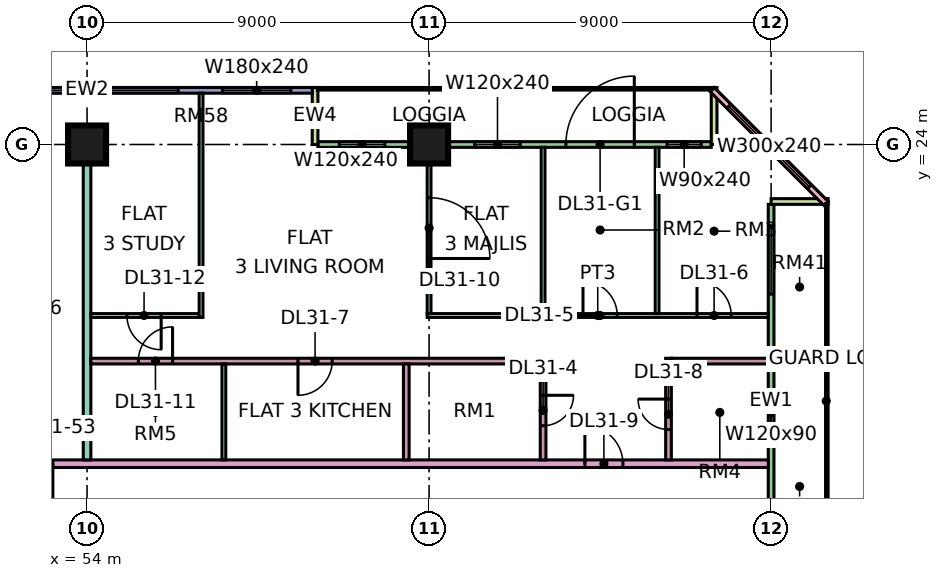
"""IFC4 building model, lengths in metres.
Left out: names, types, materials, properties, quantities, classifications, styles, units other than length and angle.
Written with IfcOpenShell. Run it as: python <this file> out.ifc"""

import sys

from ifc_helpers import new_model, si_unit, direction, frame, frame_2d, origin, origin_2d, place, context, subcontext, project, spatial, rectangle, extrude, element, fill, save


model = new_model("IFC4")
c1 = context("Model", 3, precision=1e-05, world=origin(), true_north=direction((0.0, 1.0)))
c2 = subcontext(c1, "Body", "Model", "MODEL_VIEW")
j1 = project(units=[si_unit("LENGTHUNIT", "METRE"), si_unit("PLANEANGLEUNIT", "RADIAN")], contexts=[c1])
p1 = place(None, origin())
s1 = spatial("IfcSite", under=j1, at=p1, CompositionType="ELEMENT")
p2 = place(p1, origin())
s2 = spatial("IfcBuilding", under=s1, at=p2, CompositionType="ELEMENT")
p3 = place(p2, frame((0.0, 0.0, 133.15)))
s3 = spatial("IfcBuildingStorey", under=s2, at=p3, CompositionType="ELEMENT", Elevation=133.15)
for number, where, z_axis, x_axis in (
    (1, (54.0, 24.0, 0.0), (0.0, 0.0, 1.0), (1.0, 0.0, 0.0)),
    (2, (63.0, 24.0, 0.0), (0.0, 0.0, 1.0), (1.0, 0.0, 0.0)),
):
    element("IfcColumn", number, at=place(p3, frame(where, z_axis=z_axis, x_axis=x_axis)), inside=s3, PredefinedType="COLUMN", context=c2, shape_type="SweptSolid", body=[
        extrude(rectangle(XDim=1.0, YDim=1.0, at=origin_2d()), origin(), (0.0, 0.0, 1.0), 3.75),
    ])
p4 = place(p3, frame((70.425, 24.0, 0.0), z_axis=(0.0, 0.0, 1.0), x_axis=(-1.0, 0.0, 0.0)))
e3 = element("IfcWall", 3, at=p4, inside=s3, PredefinedType="SOLIDWALL", context=c2, shape_type="SweptSolid", body=[
    extrude(rectangle(XDim=10.35, YDim=0.15, at=frame_2d((5.175, 0.0))), origin(), (0.0, 0.0, 1.0), 3.35),
])
p5 = place(p4, frame((0.262, 0.0, 0.45)))
e4 = element("IfcOpeningElement", 4, at=p5, cuts=e3, PredefinedType="OPENING", context=c2, shape_type="SweptSolid", body=[
    extrude(rectangle(XDim=0.9, YDim=2.4, at=frame_2d((0.45, 1.2))), frame((0.0, 0.085, 0.0), z_axis=(0.0, -1.0, 0.0), x_axis=(1.0, 0.0, 0.0)), (0.0, 0.0, 1.0), 0.17),
])
p6 = place(p4, frame((2.025, 0.0, 0.0)))
e5 = element("IfcOpeningElement", 5, at=p6, cuts=e3, PredefinedType="OPENING", context=c2, shape_type="SweptSolid", body=[
    extrude(rectangle(XDim=1.8, YDim=2.4, at=frame_2d((0.9, 1.2))), frame((0.0, 0.085, 0.0), z_axis=(0.0, -1.0, 0.0), x_axis=(1.0, 0.0, 0.0)), (0.0, 0.0, 1.0), 0.17),
])
p7 = place(p4, frame((5.025, 0.0, 0.45)))
e6 = element("IfcOpeningElement", 6, at=p7, cuts=e3, PredefinedType="OPENING", context=c2, shape_type="SweptSolid", body=[
    extrude(rectangle(XDim=1.2, YDim=2.4, at=frame_2d((0.6, 1.2))), frame((0.0, 0.085, 0.0), z_axis=(0.0, -1.0, 0.0), x_axis=(1.0, 0.0, 0.0)), (0.0, 0.0, 1.0), 0.17),
])
p8 = place(p4, frame((8.587, 0.0, 0.45)))
e7 = element("IfcOpeningElement", 7, at=p8, cuts=e3, PredefinedType="OPENING", context=c2, shape_type="SweptSolid", body=[
    extrude(rectangle(XDim=1.2, YDim=2.4, at=frame_2d((0.6, 1.2))), frame((0.0, 0.085, 0.0), z_axis=(0.0, -1.0, 0.0), x_axis=(1.0, 0.0, 0.0)), (0.0, 0.0, 1.0), 0.17),
])
for number, where, z_axis, x_axis in (
    (8, (70.5, 25.5, 0.0), (0.0, 0.0, 1.0), (0.0, -1.0, 0.0)),
    (9, (60.0, 25.5, 0.0), (0.0, 0.0, 1.0), (0.0, -1.0, 0.0)),
):
    element("IfcWall", number, at=place(p3, frame(where, z_axis=z_axis, x_axis=x_axis)), inside=s3, PredefinedType="SOLIDWALL", context=c2, shape_type="SweptSolid", body=[
        extrude(rectangle(XDim=1.5, YDim=0.15, at=frame_2d((0.75, 0.0))), origin(), (0.0, 0.0, 1.0), 3.35),
    ])
p9 = place(p3, frame((59.925, 25.425, 0.0), z_axis=(0.0, 0.0, 1.0), x_axis=(-1.0, 0.0, 0.0)))
e10 = element("IfcWall", 10, at=p9, inside=s3, PredefinedType="SOLIDWALL", context=c2, shape_type="SweptSolid", body=[
    extrude(rectangle(XDim=11.85, YDim=0.15, at=frame_2d((5.925, 0.0))), origin(), (0.0, 0.0, 1.0), 3.35),
])
p10 = place(p9, frame((0.562, 0.0, 0.45)))
e11 = element("IfcOpeningElement", 11, at=p10, cuts=e10, PredefinedType="OPENING", context=c2, shape_type="SweptSolid", body=[
    extrude(rectangle(XDim=1.8, YDim=2.4, at=frame_2d((0.9, 1.2))), frame((0.0, 0.085, 0.0), z_axis=(0.0, -1.0, 0.0), x_axis=(1.0, 0.0, 0.0)), (0.0, 0.0, 1.0), 0.17),
])
p11 = place(p9, frame((3.525, 0.0, 0.45)))
e12 = element("IfcOpeningElement", 12, at=p11, cuts=e10, PredefinedType="OPENING", context=c2, shape_type="SweptSolid", body=[
    extrude(rectangle(XDim=1.8, YDim=2.4, at=frame_2d((0.9, 1.2))), frame((0.0, 0.085, 0.0), z_axis=(0.0, -1.0, 0.0), x_axis=(1.0, 0.0, 0.0)), (0.0, 0.0, 1.0), 0.17),
])
p12 = place(p9, frame((6.488, 0.0, 0.45)))
e13 = element("IfcOpeningElement", 13, at=p12, cuts=e10, PredefinedType="OPENING", context=c2, shape_type="SweptSolid", body=[
    extrude(rectangle(XDim=4.8, YDim=2.4, at=frame_2d((2.4, 1.2))), frame((0.0, 0.085, 0.0), z_axis=(0.0, -1.0, 0.0), x_axis=(1.0, 0.0, 0.0)), (0.0, 0.0, 1.0), 0.17),
])
p13 = place(p3, frame((72.0, 12.075, 0.0), z_axis=(0.0, 0.0, 1.0), x_axis=(0.0, 1.0, 0.0)))
e14 = element("IfcWall", 14, at=p13, inside=s3, PredefinedType="SOLIDWALL", context=c2, shape_type="SweptSolid", body=[
    extrude(rectangle(XDim=10.35, YDim=0.15, at=frame_2d((5.175, 0.0))), origin(), (0.0, 0.0, 1.0), 3.35),
])
p14 = place(p13, frame((4.275, 0.0, 1.7)))
e15 = element("IfcOpeningElement", 15, at=p14, cuts=e14, PredefinedType="OPENING", context=c2, shape_type="SweptSolid", body=[
    extrude(rectangle(XDim=1.2, YDim=0.9, at=frame_2d((0.6, 0.45))), frame((0.0, 0.085, 0.0), z_axis=(0.0, -1.0, 0.0), x_axis=(1.0, 0.0, 0.0)), (0.0, 0.0, 1.0), 0.17),
])
p15 = place(p13, frame((7.988, 0.0, 0.45)))
e16 = element("IfcOpeningElement", 16, at=p15, cuts=e14, PredefinedType="OPENING", context=c2, shape_type="SweptSolid", body=[
    extrude(rectangle(XDim=1.8, YDim=2.4, at=frame_2d((0.9, 1.2))), frame((0.0, 0.085, 0.0), z_axis=(0.0, -1.0, 0.0), x_axis=(1.0, 0.0, 0.0)), (0.0, 0.0, 1.0), 0.17),
])
p16 = place(p3, frame((73.5, 22.5, 0.0), z_axis=(0.0, 0.0, 1.0), x_axis=(-1.0, 0.0, 0.0)))
e17 = element("IfcWall", 17, at=p16, inside=s3, PredefinedType="SOLIDWALL", context=c2, shape_type="SweptSolid", body=[
    extrude(rectangle(XDim=1.5, YDim=0.15, at=frame_2d((0.75, 0.0))), origin(), (0.0, 0.0, 1.0), 3.35),
])
p17 = place(p3, frame((73.447, 22.447, 0.0), z_axis=(0.0, 0.0, 1.0), x_axis=(-0.707106781187, 0.707106781187, 0.0)))
e18 = element("IfcWall", 18, at=p17, inside=s3, PredefinedType="SOLIDWALL", context=c2, shape_type="SweptSolid", body=[
    extrude(rectangle(XDim=4.243, YDim=0.15, at=frame_2d((2.121, 0.0))), origin(), (0.0, 0.0, 1.0), 3.35),
])
p18 = place(p17, frame((0.621, 0.0, 0.45)))
e19 = element("IfcOpeningElement", 19, at=p18, cuts=e18, PredefinedType="OPENING", context=c2, shape_type="SweptSolid", body=[
    extrude(rectangle(XDim=3.0, YDim=2.4, at=frame_2d((1.5, 1.2))), frame((0.0, 0.085, 0.0), z_axis=(0.0, -1.0, 0.0), x_axis=(1.0, 0.0, 0.0)), (0.0, 0.0, 1.0), 0.17),
])
p19 = place(p3, frame((51.225, 15.6, 0.0), z_axis=(0.0, 0.0, 1.0), x_axis=(1.0, 0.0, 0.0)))
e20 = element("IfcWall", 20, at=p19, inside=s3, PredefinedType="PARTITIONING", context=c2, shape_type="SweptSolid", body=[
    extrude(rectangle(XDim=20.701, YDim=0.2, at=frame_2d((10.351, 0.0))), origin(), (0.0, 0.0, 1.0), 3.35),
])
p20 = place(p19, frame((15.875, 0.0, 0.0)))
e21 = element("IfcOpeningElement", 21, at=p20, cuts=e20, PredefinedType="OPENING", context=c2, shape_type="SweptSolid", body=[
    extrude(rectangle(XDim=1.0, YDim=2.1, at=frame_2d((0.5, 1.05))), frame((0.0, 0.11, 0.0), z_axis=(0.0, -1.0, 0.0), x_axis=(1.0, 0.0, 0.0)), (0.0, 0.0, 1.0), 0.22),
])
p21 = place(p19, frame((0.875, 0.0, 0.0)))
e22 = element("IfcOpeningElement", 22, at=p21, cuts=e20, PredefinedType="OPENING", context=c2, shape_type="SweptSolid", body=[
    extrude(rectangle(XDim=1.0, YDim=2.1, at=frame_2d((0.5, 1.05))), frame((0.0, 0.11, 0.0), z_axis=(0.0, -1.0, 0.0), x_axis=(1.0, 0.0, 0.0)), (0.0, 0.0, 1.0), 0.22),
])
p22 = place(p3, frame((54.0, 15.7, 0.0), z_axis=(0.0, 0.0, 1.0), x_axis=(0.0, 1.0, 0.0)))
e23 = element("IfcWall", 23, at=p22, inside=s3, PredefinedType="PARTITIONING", context=c2, shape_type="SweptSolid", body=[
    extrude(rectangle(XDim=8.3, YDim=0.2, at=frame_2d((4.15, 0.0))), origin(), (0.0, 0.0, 1.0), 3.35),
])
p23 = place(p3, frame((54.1, 18.3, 0.0), z_axis=(0.0, 0.0, 1.0), x_axis=(1.0, 0.0, 0.0)))
e24 = element("IfcWall", 24, at=p23, inside=s3, PredefinedType="PARTITIONING", context=c2, shape_type="SweptSolid", body=[
    extrude(rectangle(XDim=11.975, YDim=0.15, at=frame_2d((5.987, 0.0))), origin(), (0.0, 0.0, 1.0), 3.35),
])
p24 = place(p23, frame((5.45, 0.0, 0.0)))
e25 = element("IfcOpeningElement", 25, at=p24, cuts=e24, PredefinedType="OPENING", context=c2, shape_type="SweptSolid", body=[
    extrude(rectangle(XDim=0.9, YDim=2.1, at=frame_2d((0.45, 1.05))), frame((0.0, 0.085, 0.0), z_axis=(0.0, -1.0, 0.0), x_axis=(1.0, 0.0, 0.0)), (0.0, 0.0, 1.0), 0.17),
])
p25 = place(p23, frame((1.25, 0.0, 0.0)))
e26 = element("IfcOpeningElement", 26, at=p25, cuts=e24, PredefinedType="OPENING", context=c2, shape_type="SweptSolid", body=[
    extrude(rectangle(XDim=0.9, YDim=2.1, at=frame_2d((0.45, 1.05))), frame((0.0, 0.085, 0.0), z_axis=(0.0, -1.0, 0.0), x_axis=(1.0, 0.0, 0.0)), (0.0, 0.0, 1.0), 0.17),
])
p26 = place(p3, frame((54.1, 19.5, 0.0), z_axis=(0.0, 0.0, 1.0), x_axis=(1.0, 0.0, 0.0)))
e27 = element("IfcWall", 27, at=p26, inside=s3, PredefinedType="PARTITIONING", context=c2, shape_type="SweptSolid", body=[
    extrude(rectangle(XDim=2.85, YDim=0.1, at=frame_2d((1.425, 0.0))), origin(), (0.0, 0.0, 1.0), 3.35),
])
p27 = place(p26, frame((0.95, 0.0, 0.0)))
e28 = element("IfcOpeningElement", 28, at=p27, cuts=e27, PredefinedType="OPENING", context=c2, shape_type="SweptSolid", body=[
    extrude(rectangle(XDim=0.9, YDim=2.1, at=frame_2d((0.45, 1.05))), frame((0.0, 0.06, 0.0), z_axis=(0.0, -1.0, 0.0), x_axis=(1.0, 0.0, 0.0)), (0.0, 0.0, 1.0), 0.12),
])
p28 = place(p3, frame((57.0, 19.45, 0.0), z_axis=(0.0, 0.0, 1.0), x_axis=(0.0, 1.0, 0.0)))
e29 = element("IfcWall", 29, at=p28, inside=s3, PredefinedType="PARTITIONING", context=c2, shape_type="SweptSolid", body=[
    extrude(rectangle(XDim=5.9, YDim=0.1, at=frame_2d((2.95, 0.0))), origin(), (0.0, 0.0, 1.0), 3.35),
])
p29 = place(p3, frame((57.6, 15.7, 0.0), z_axis=(0.0, 0.0, 1.0), x_axis=(0.0, 1.0, 0.0)))
e30 = element("IfcWall", 30, at=p29, inside=s3, PredefinedType="PARTITIONING", context=c2, shape_type="SweptSolid", body=[
    extrude(rectangle(XDim=2.525, YDim=0.1, at=frame_2d((1.263, 0.0))), origin(), (0.0, 0.0, 1.0), 3.35),
])
p30 = place(p3, frame((62.4, 15.7, 0.0), z_axis=(0.0, 0.0, 1.0), x_axis=(0.0, 1.0, 0.0)))
e31 = element("IfcWall", 31, at=p30, inside=s3, PredefinedType="PARTITIONING", context=c2, shape_type="SweptSolid", body=[
    extrude(rectangle(XDim=2.525, YDim=0.15, at=frame_2d((1.263, 0.0))), origin(), (0.0, 0.0, 1.0), 3.35),
])
p31 = place(p3, frame((62.95, 19.5, 0.0), z_axis=(0.0, 0.0, 1.0), x_axis=(1.0, 0.0, 0.0)))
e32 = element("IfcWall", 32, at=p31, inside=s3, PredefinedType="PARTITIONING", context=c2, shape_type="SweptSolid", body=[
    extrude(rectangle(XDim=8.976, YDim=0.1, at=frame_2d((4.488, 0.0))), origin(), (0.0, 0.0, 1.0), 3.35),
])
p32 = place(p31, frame((4.1, 0.0, 0.0)))
e33 = element("IfcOpeningElement", 33, at=p32, cuts=e32, PredefinedType="OPENING", context=c2, shape_type="SweptSolid", body=[
    extrude(rectangle(XDim=0.9, YDim=2.1, at=frame_2d((0.45, 1.05))), frame((0.0, 0.06, 0.0), z_axis=(0.0, -1.0, 0.0), x_axis=(1.0, 0.0, 0.0)), (0.0, 0.0, 1.0), 0.12),
])
p33 = place(p31, frame((7.1, 0.0, 0.0)))
e34 = element("IfcOpeningElement", 34, at=p33, cuts=e32, PredefinedType="OPENING", context=c2, shape_type="SweptSolid", body=[
    extrude(rectangle(XDim=0.9, YDim=2.1, at=frame_2d((0.45, 1.05))), frame((0.0, 0.06, 0.0), z_axis=(0.0, -1.0, 0.0), x_axis=(1.0, 0.0, 0.0)), (0.0, 0.0, 1.0), 0.12),
])
p34 = place(p3, frame((63.0, 19.55, 0.0), z_axis=(0.0, 0.0, 1.0), x_axis=(0.0, 1.0, 0.0)))
e35 = element("IfcWall", 35, at=p34, inside=s3, PredefinedType="PARTITIONING", context=c2, shape_type="SweptSolid", body=[
    extrude(rectangle(XDim=4.376, YDim=0.1, at=frame_2d((2.188, 0.0))), origin(), (0.0, 0.0, 1.0), 3.35),
])
p35 = place(p34, frame((1.45, 0.0, 0.0)))
e36 = element("IfcOpeningElement", 36, at=p35, cuts=e35, PredefinedType="OPENING", context=c2, shape_type="SweptSolid", body=[
    extrude(rectangle(XDim=1.6, YDim=2.1, at=frame_2d((0.8, 1.05))), frame((0.0, 0.06, 0.0), z_axis=(0.0, -1.0, 0.0), x_axis=(1.0, 0.0, 0.0)), (0.0, 0.0, 1.0), 0.12),
])
p36 = place(p3, frame((66.0, 15.7, 0.0), z_axis=(0.0, 0.0, 1.0), x_axis=(0.0, 1.0, 0.0)))
e37 = element("IfcWall", 37, at=p36, inside=s3, PredefinedType="PARTITIONING", context=c2, shape_type="SweptSolid", body=[
    extrude(rectangle(XDim=2.525, YDim=0.15, at=frame_2d((1.263, 0.0))), origin(), (0.0, 0.0, 1.0), 3.35),
])
p37 = place(p36, frame((0.9, 0.0, 0.0)))
e38 = element("IfcOpeningElement", 38, at=p37, cuts=e37, PredefinedType="OPENING", context=c2, shape_type="SweptSolid", body=[
    extrude(rectangle(XDim=0.8, YDim=2.1, at=frame_2d((0.4, 1.05))), frame((0.0, 0.085, 0.0), z_axis=(0.0, -1.0, 0.0), x_axis=(1.0, 0.0, 0.0)), (0.0, 0.0, 1.0), 0.17),
])
for number, where, z_axis, x_axis in (
    (39, (66.0, 19.55, 0.0), (0.0, 0.0, 1.0), (0.0, 1.0, 0.0)),
    (40, (69.0, 19.55, 0.0), (0.0, 0.0, 1.0), (0.0, 1.0, 0.0)),
):
    element("IfcWall", number, at=place(p3, frame(where, z_axis=z_axis, x_axis=x_axis)), inside=s3, PredefinedType="PARTITIONING", context=c2, shape_type="SweptSolid", body=[
        extrude(rectangle(XDim=4.376, YDim=0.1, at=frame_2d((2.188, 0.0))), origin(), (0.0, 0.0, 1.0), 3.35),
    ])
p38 = place(p3, frame((69.3, 15.7, 0.0), z_axis=(0.0, 0.0, 1.0), x_axis=(0.0, 1.0, 0.0)))
e41 = element("IfcWall", 41, at=p38, inside=s3, PredefinedType="PARTITIONING", context=c2, shape_type="SweptSolid", body=[
    extrude(rectangle(XDim=2.675, YDim=0.15, at=frame_2d((1.337, 0.0))), origin(), (0.0, 0.0, 1.0), 3.35),
])
p39 = place(p38, frame((0.8, 0.0, 0.0)))
e42 = element("IfcOpeningElement", 42, at=p39, cuts=e41, PredefinedType="OPENING", context=c2, shape_type="SweptSolid", body=[
    extrude(rectangle(XDim=0.8, YDim=2.1, at=frame_2d((0.4, 1.05))), frame((0.0, 0.085, 0.0), z_axis=(0.0, -1.0, 0.0), x_axis=(1.0, 0.0, 0.0)), (0.0, 0.0, 1.0), 0.17),
])
p40 = place(p3, frame((69.375, 18.3, 0.0), z_axis=(0.0, 0.0, 1.0), x_axis=(1.0, 0.0, 0.0)))
e43 = element("IfcWall", 43, at=p40, inside=s3, PredefinedType="PARTITIONING", context=c2, shape_type="SweptSolid", body=[
    extrude(rectangle(XDim=2.551, YDim=0.15, at=frame_2d((1.275, 0.0))), origin(), (0.0, 0.0, 1.0), 3.35),
])
p41 = place(p5, origin())
e44 = element("IfcWindow", 44, at=p41, inside=s3, PartitioningType="SINGLE_PANEL", PredefinedType="WINDOW", context=c2, shape_type="SweptSolid", body=[
    extrude(rectangle(XDim=0.9, YDim=2.4, at=frame_2d((0.45, 1.2))), frame((0.0, 0.03, 0.0), z_axis=(0.0, -1.0, 0.0), x_axis=(1.0, 0.0, 0.0)), (0.0, 0.0, 1.0), 0.06),
])
fill(e4, e44)
p42 = place(p6, frame((1.8, 0.0, 0.0), z_axis=(0.0, 0.0, 1.0), x_axis=(-1.0, 0.0, 0.0)))
e45 = element("IfcDoor", 45, at=p42, inside=s3, OperationType="DOUBLE_DOOR_SINGLE_SWING", PredefinedType="DOOR", context=c2, shape_type="SweptSolid", body=[
    extrude(rectangle(XDim=1.8, YDim=2.4, at=frame_2d((0.9, 1.2))), frame((0.0, 0.025, 0.0), z_axis=(0.0, -1.0, 0.0), x_axis=(1.0, 0.0, 0.0)), (0.0, 0.0, 1.0), 0.05),
])
fill(e5, e45)
p43 = place(p7, origin())
e46 = element("IfcWindow", 46, at=p43, inside=s3, PartitioningType="SINGLE_PANEL", PredefinedType="WINDOW", context=c2, shape_type="SweptSolid", body=[
    extrude(rectangle(XDim=1.2, YDim=2.4, at=frame_2d((0.6, 1.2))), frame((0.0, 0.03, 0.0), z_axis=(0.0, -1.0, 0.0), x_axis=(1.0, 0.0, 0.0)), (0.0, 0.0, 1.0), 0.06),
])
fill(e6, e46)
p44 = place(p8, origin())
e47 = element("IfcWindow", 47, at=p44, inside=s3, PartitioningType="SINGLE_PANEL", PredefinedType="WINDOW", context=c2, shape_type="SweptSolid", body=[
    extrude(rectangle(XDim=1.2, YDim=2.4, at=frame_2d((0.6, 1.2))), frame((0.0, 0.03, 0.0), z_axis=(0.0, -1.0, 0.0), x_axis=(1.0, 0.0, 0.0)), (0.0, 0.0, 1.0), 0.06),
])
fill(e7, e47)
p45 = place(p10, origin())
e48 = element("IfcWindow", 48, at=p45, inside=s3, PartitioningType="SINGLE_PANEL", PredefinedType="WINDOW", context=c2, shape_type="SweptSolid", body=[
    extrude(rectangle(XDim=1.8, YDim=2.4, at=frame_2d((0.9, 1.2))), frame((0.0, 0.03, 0.0), z_axis=(0.0, -1.0, 0.0), x_axis=(1.0, 0.0, 0.0)), (0.0, 0.0, 1.0), 0.06),
])
fill(e11, e48)
p46 = place(p11, origin())
e49 = element("IfcWindow", 49, at=p46, inside=s3, PartitioningType="SINGLE_PANEL", PredefinedType="WINDOW", context=c2, shape_type="SweptSolid", body=[
    extrude(rectangle(XDim=1.8, YDim=2.4, at=frame_2d((0.9, 1.2))), frame((0.0, 0.03, 0.0), z_axis=(0.0, -1.0, 0.0), x_axis=(1.0, 0.0, 0.0)), (0.0, 0.0, 1.0), 0.06),
])
fill(e12, e49)
p47 = place(p12, origin())
e50 = element("IfcWindow", 50, at=p47, inside=s3, PartitioningType="SINGLE_PANEL", PredefinedType="WINDOW", context=c2, shape_type="SweptSolid", body=[
    extrude(rectangle(XDim=4.8, YDim=2.4, at=frame_2d((2.4, 1.2))), frame((0.0, 0.03, 0.0), z_axis=(0.0, -1.0, 0.0), x_axis=(1.0, 0.0, 0.0)), (0.0, 0.0, 1.0), 0.06),
])
fill(e13, e50)
p48 = place(p14, origin())
e51 = element("IfcWindow", 51, at=p48, inside=s3, PartitioningType="SINGLE_PANEL", PredefinedType="WINDOW", context=c2, shape_type="SweptSolid", body=[
    extrude(rectangle(XDim=1.2, YDim=0.9, at=frame_2d((0.6, 0.45))), frame((0.0, 0.03, 0.0), z_axis=(0.0, -1.0, 0.0), x_axis=(1.0, 0.0, 0.0)), (0.0, 0.0, 1.0), 0.06),
])
fill(e15, e51)
p49 = place(p15, origin())
e52 = element("IfcWindow", 52, at=p49, inside=s3, PartitioningType="SINGLE_PANEL", PredefinedType="WINDOW", context=c2, shape_type="SweptSolid", body=[
    extrude(rectangle(XDim=1.8, YDim=2.4, at=frame_2d((0.9, 1.2))), frame((0.0, 0.03, 0.0), z_axis=(0.0, -1.0, 0.0), x_axis=(1.0, 0.0, 0.0)), (0.0, 0.0, 1.0), 0.06),
])
fill(e16, e52)
p50 = place(p18, origin())
e53 = element("IfcWindow", 53, at=p50, inside=s3, PartitioningType="SINGLE_PANEL", PredefinedType="WINDOW", context=c2, shape_type="SweptSolid", body=[
    extrude(rectangle(XDim=3.0, YDim=2.4, at=frame_2d((1.5, 1.2))), frame((0.0, 0.03, 0.0), z_axis=(0.0, -1.0, 0.0), x_axis=(1.0, 0.0, 0.0)), (0.0, 0.0, 1.0), 0.06),
])
fill(e19, e53)
p51 = place(p37, origin())
e54 = element("IfcDoor", 54, at=p51, inside=s3, OperationType="SINGLE_SWING_RIGHT", PredefinedType="DOOR", context=c2, shape_type="SweptSolid", body=[
    extrude(rectangle(XDim=0.8, YDim=2.1, at=frame_2d((0.4, 1.05))), frame((0.0, 0.025, 0.0), z_axis=(0.0, -1.0, 0.0), x_axis=(1.0, 0.0, 0.0)), (0.0, 0.0, 1.0), 0.05),
])
fill(e38, e54)
p52 = place(p32, origin())
e55 = element("IfcDoor", 55, at=p52, inside=s3, OperationType="SINGLE_SWING_LEFT", PredefinedType="DOOR", context=c2, shape_type="SweptSolid", body=[
    extrude(rectangle(XDim=0.9, YDim=2.1, at=frame_2d((0.45, 1.05))), frame((0.0, 0.025, 0.0), z_axis=(0.0, -1.0, 0.0), x_axis=(1.0, 0.0, 0.0)), (0.0, 0.0, 1.0), 0.05),
])
fill(e33, e55)
p53 = place(p33, origin())
e56 = element("IfcDoor", 56, at=p53, inside=s3, OperationType="SINGLE_SWING_LEFT", PredefinedType="DOOR", context=c2, shape_type="SweptSolid", body=[
    extrude(rectangle(XDim=0.9, YDim=2.1, at=frame_2d((0.45, 1.05))), frame((0.0, 0.025, 0.0), z_axis=(0.0, -1.0, 0.0), x_axis=(1.0, 0.0, 0.0)), (0.0, 0.0, 1.0), 0.05),
])
fill(e34, e56)
p54 = place(p24, frame((0.9, 0.0, 0.0), z_axis=(0.0, 0.0, 1.0), x_axis=(-1.0, 0.0, 0.0)))
e57 = element("IfcDoor", 57, at=p54, inside=s3, OperationType="SINGLE_SWING_LEFT", PredefinedType="DOOR", context=c2, shape_type="SweptSolid", body=[
    extrude(rectangle(XDim=0.9, YDim=2.1, at=frame_2d((0.45, 1.05))), frame((0.0, 0.025, 0.0), z_axis=(0.0, -1.0, 0.0), x_axis=(1.0, 0.0, 0.0)), (0.0, 0.0, 1.0), 0.05),
])
fill(e25, e57)
p55 = place(p39, frame((0.8, 0.0, 0.0), z_axis=(0.0, 0.0, 1.0), x_axis=(-1.0, 0.0, 0.0)))
e58 = element("IfcDoor", 58, at=p55, inside=s3, OperationType="SINGLE_SWING_RIGHT", PredefinedType="DOOR", context=c2, shape_type="SweptSolid", body=[
    extrude(rectangle(XDim=0.8, YDim=2.1, at=frame_2d((0.4, 1.05))), frame((0.0, 0.025, 0.0), z_axis=(0.0, -1.0, 0.0), x_axis=(1.0, 0.0, 0.0)), (0.0, 0.0, 1.0), 0.05),
])
fill(e42, e58)
p56 = place(p20, origin())
e59 = element("IfcDoor", 59, at=p56, inside=s3, OperationType="SINGLE_SWING_LEFT", PredefinedType="DOOR", context=c2, shape_type="SweptSolid", body=[
    extrude(rectangle(XDim=1.0, YDim=2.1, at=frame_2d((0.5, 1.05))), frame((0.0, 0.025, 0.0), z_axis=(0.0, -1.0, 0.0), x_axis=(1.0, 0.0, 0.0)), (0.0, 0.0, 1.0), 0.05),
])
fill(e21, e59)
p57 = place(p35, frame((1.6, 0.0, 0.0), z_axis=(0.0, 0.0, 1.0), x_axis=(-1.0, 0.0, 0.0)))
e60 = element("IfcDoor", 60, at=p57, inside=s3, OperationType="DOUBLE_DOOR_SINGLE_SWING", PredefinedType="DOOR", context=c2, shape_type="SweptSolid", body=[
    extrude(rectangle(XDim=1.6, YDim=2.1, at=frame_2d((0.8, 1.05))), frame((0.0, 0.025, 0.0), z_axis=(0.0, -1.0, 0.0), x_axis=(1.0, 0.0, 0.0)), (0.0, 0.0, 1.0), 0.05),
])
fill(e36, e60)
p58 = place(p25, frame((0.9, 0.0, 0.0), z_axis=(0.0, 0.0, 1.0), x_axis=(-1.0, 0.0, 0.0)))
e61 = element("IfcDoor", 61, at=p58, inside=s3, OperationType="SINGLE_SWING_RIGHT", PredefinedType="DOOR", context=c2, shape_type="SweptSolid", body=[
    extrude(rectangle(XDim=0.9, YDim=2.1, at=frame_2d((0.45, 1.05))), frame((0.0, 0.025, 0.0), z_axis=(0.0, -1.0, 0.0), x_axis=(1.0, 0.0, 0.0)), (0.0, 0.0, 1.0), 0.05),
])
fill(e26, e61)
p59 = place(p27, origin())
e62 = element("IfcDoor", 62, at=p59, inside=s3, OperationType="SINGLE_SWING_RIGHT", PredefinedType="DOOR", context=c2, shape_type="SweptSolid", body=[
    extrude(rectangle(XDim=0.9, YDim=2.1, at=frame_2d((0.45, 1.05))), frame((0.0, 0.025, 0.0), z_axis=(0.0, -1.0, 0.0), x_axis=(1.0, 0.0, 0.0)), (0.0, 0.0, 1.0), 0.05),
])
fill(e28, e62)
p60 = place(p21, origin())
e63 = element("IfcDoor", 63, at=p60, inside=s3, OperationType="SINGLE_SWING_RIGHT", PredefinedType="DOOR", context=c2, shape_type="SweptSolid", body=[
    extrude(rectangle(XDim=1.0, YDim=2.1, at=frame_2d((0.5, 1.05))), frame((0.0, 0.025, 0.0), z_axis=(0.0, -1.0, 0.0), x_axis=(1.0, 0.0, 0.0)), (0.0, 0.0, 1.0), 0.05),
])
fill(e22, e63)
save(model, sys.argv[1])
